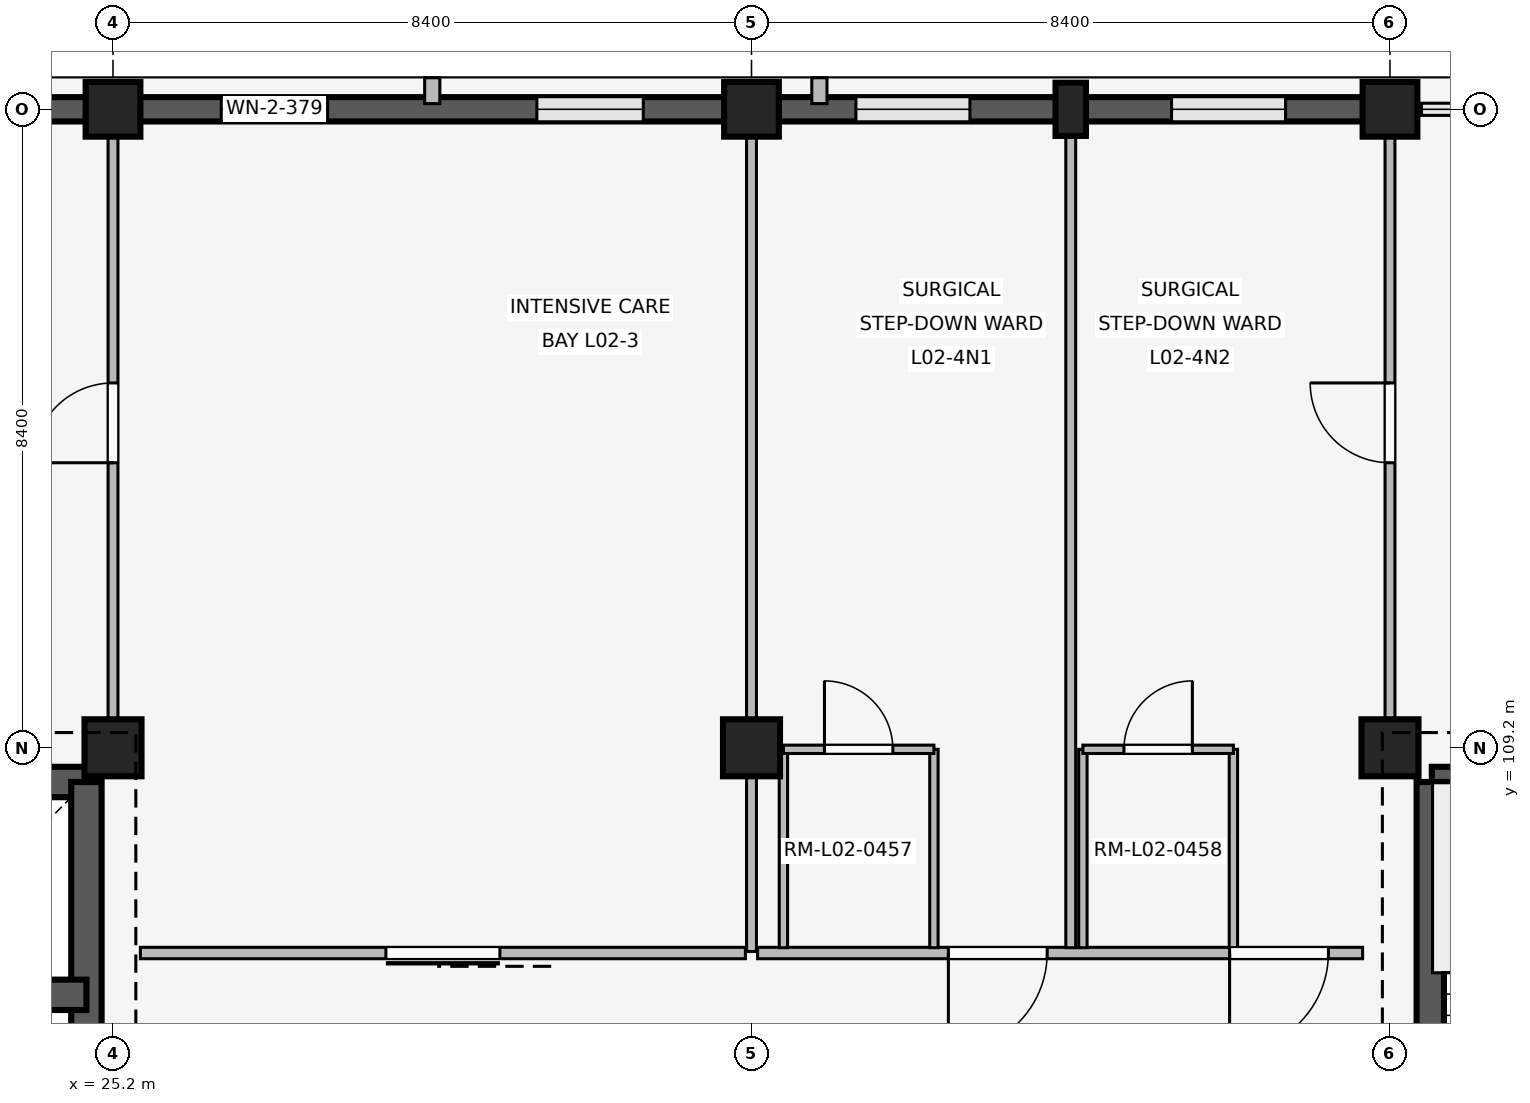
"""IFC4 building model, lengths in metres.
Left out: names, types, materials, properties, quantities, classifications, styles, units other than length and angle.
Written with IfcOpenShell. Run it as: python <this file> out.ifc"""

import sys

from ifc_helpers import new_model, si_unit, direction, frame, frame_2d, origin, origin_2d, place, context, subcontext, project, spatial, rectangle, extrude, element, fill, save


model = new_model("IFC4")
c1 = context("Model", 3, precision=1e-05, world=origin(), true_north=direction((0.0, 1.0)))
c2 = subcontext(c1, "Body", "Model", "MODEL_VIEW")
j1 = project(units=[si_unit("LENGTHUNIT", "METRE"), si_unit("PLANEANGLEUNIT", "RADIAN")], contexts=[c1])
p1 = place(None, origin())
s1 = spatial("IfcSite", under=j1, at=p1, CompositionType="ELEMENT")
p2 = place(p1, origin())
s2 = spatial("IfcBuilding", under=s1, at=p2, CompositionType="ELEMENT")
p3 = place(p2, frame((0.0, 0.0, 8.1)))
s3 = spatial("IfcBuildingStorey", under=s2, at=p3, CompositionType="ELEMENT", Elevation=8.1)
p4 = place(p3, frame((25.2, 109.2, 0.0), z_axis=(0.0, 0.0, 1.0), x_axis=(1.0, 0.0, 0.0)))
e1 = element("IfcColumn", 1, at=p4, inside=s3, PredefinedType="COLUMN", context=c2, shape_type="SweptSolid", body=[
    extrude(rectangle(XDim=0.75, YDim=0.75, at=origin_2d()), origin(), (0.0, 0.0, 1.0), 4.8),
])
p5 = place(p3, frame((25.2, 117.6, 0.0), z_axis=(0.0, 0.0, 1.0), x_axis=(1.0, 0.0, 0.0)))
e2 = element("IfcColumn", 2, at=p5, inside=s3, PredefinedType="COLUMN", context=c2, shape_type="SweptSolid", body=[
    extrude(rectangle(XDim=0.72, YDim=0.72, at=origin_2d()), origin(), (0.0, 0.0, 1.0), 4.8),
])
p6 = place(p3, frame((33.6, 109.2, 0.0), z_axis=(0.0, 0.0, 1.0), x_axis=(1.0, 0.0, 0.0)))
e3 = element("IfcColumn", 3, at=p6, inside=s3, PredefinedType="COLUMN", context=c2, shape_type="SweptSolid", body=[
    extrude(rectangle(XDim=0.75, YDim=0.75, at=origin_2d()), origin(), (0.0, 0.0, 1.0), 4.8),
])
p7 = place(p3, frame((33.6, 117.6, 0.0), z_axis=(0.0, 0.0, 1.0), x_axis=(1.0, 0.0, 0.0)))
e4 = element("IfcColumn", 4, at=p7, inside=s3, PredefinedType="COLUMN", context=c2, shape_type="SweptSolid", body=[
    extrude(rectangle(XDim=0.72, YDim=0.72, at=origin_2d()), origin(), (0.0, 0.0, 1.0), 4.8),
])
p8 = place(p3, frame((42.0, 109.2, 0.0), z_axis=(0.0, 0.0, 1.0), x_axis=(1.0, 0.0, 0.0)))
e5 = element("IfcColumn", 5, at=p8, inside=s3, PredefinedType="COLUMN", context=c2, shape_type="SweptSolid", body=[
    extrude(rectangle(XDim=0.75, YDim=0.75, at=origin_2d()), origin(), (0.0, 0.0, 1.0), 4.8),
])
p9 = place(p3, frame((42.0, 117.6, 0.0), z_axis=(0.0, 0.0, 1.0), x_axis=(1.0, 0.0, 0.0)))
e6 = element("IfcColumn", 6, at=p9, inside=s3, PredefinedType="COLUMN", context=c2, shape_type="SweptSolid", body=[
    extrude(rectangle(XDim=0.72, YDim=0.72, at=origin_2d()), origin(), (0.0, 0.0, 1.0), 4.8),
])
p10 = place(p3, frame((37.8, 117.6, 0.0), z_axis=(0.0, 0.0, 1.0), x_axis=(1.0, 0.0, 0.0)))
e7 = element("IfcColumn", 7, at=p10, inside=s3, PredefinedType="PILASTER", context=c2, shape_type="SweptSolid", body=[
    extrude(rectangle(XDim=0.4, YDim=0.7, at=origin_2d()), origin(), (0.0, 0.0, 1.0), 4.8),
])
p11 = place(p3, frame((17.155, 117.6, 0.0), z_axis=(0.0, 0.0, 1.0), x_axis=(1.0, 0.0, 0.0)))
e8 = element("IfcWall", 8, at=p11, inside=s3, PredefinedType="SOLIDWALL", context=c2, shape_type="SweptSolid", body=[
    extrude(rectangle(XDim=7.69, YDim=0.32, at=frame_2d((3.845, 0.0))), origin(), (0.0, 0.0, 1.0), 3.86),
])
p12 = place(p11, frame((1.189, 0.0, 0.85)))
e9 = element("IfcOpeningElement", 9, at=p12, cuts=e8, PredefinedType="OPENING", context=c2, shape_type="SweptSolid", body=[
    extrude(rectangle(XDim=1.16, YDim=1.48, at=frame_2d((0.58, 0.74))), frame((0.0, 0.17, 0.0), z_axis=(0.0, -1.0, 0.0), x_axis=(1.0, 0.0, 0.0)), (0.0, 0.0, 1.0), 0.34),
])
p13 = place(p11, frame((5.341, 0.0, 0.85)))
e10 = element("IfcOpeningElement", 10, at=p13, cuts=e8, PredefinedType="OPENING", context=c2, shape_type="SweptSolid", body=[
    extrude(rectangle(XDim=1.16, YDim=1.48, at=frame_2d((0.58, 0.74))), frame((0.0, 0.17, 0.0), z_axis=(0.0, -1.0, 0.0), x_axis=(1.0, 0.0, 0.0)), (0.0, 0.0, 1.0), 0.34),
])
p14 = place(p3, frame((25.555, 117.6, 0.0), z_axis=(0.0, 0.0, 1.0), x_axis=(1.0, 0.0, 0.0)))
e11 = element("IfcWall", 11, at=p14, inside=s3, PredefinedType="SOLIDWALL", context=c2, shape_type="SweptSolid", body=[
    extrude(rectangle(XDim=7.69, YDim=0.32, at=frame_2d((3.845, 0.0))), origin(), (0.0, 0.0, 1.0), 3.86),
])
p15 = place(p14, frame((1.069, 0.0, 0.85)))
e12 = element("IfcOpeningElement", 12, at=p15, cuts=e11, PredefinedType="OPENING", context=c2, shape_type="SweptSolid", body=[
    extrude(rectangle(XDim=1.4, YDim=1.4, at=frame_2d((0.7, 0.7))), frame((0.0, 0.17, 0.0), z_axis=(0.0, -1.0, 0.0), x_axis=(1.0, 0.0, 0.0)), (0.0, 0.0, 1.0), 0.34),
])
p16 = place(p14, frame((5.221, 0.0, 0.85)))
e13 = element("IfcOpeningElement", 13, at=p16, cuts=e11, PredefinedType="OPENING", context=c2, shape_type="SweptSolid", body=[
    extrude(rectangle(XDim=1.4, YDim=1.4, at=frame_2d((0.7, 0.7))), frame((0.0, 0.17, 0.0), z_axis=(0.0, -1.0, 0.0), x_axis=(1.0, 0.0, 0.0)), (0.0, 0.0, 1.0), 0.34),
])
p17 = place(p3, frame((29.4, 117.675, 0.0), z_axis=(0.0, 0.0, 1.0), x_axis=(0.0, 1.0, 0.0)))
e14 = element("IfcWall", 14, at=p17, inside=s3, PredefinedType="ELEMENTEDWALL", context=c2, shape_type="SweptSolid", body=[
    extrude(rectangle(XDim=0.34, YDim=0.2, at=frame_2d((0.17, 0.0))), origin(), (0.0, 0.0, 1.0), 3.84),
])
p18 = place(p3, frame((33.955, 117.6, 0.0), z_axis=(0.0, 0.0, 1.0), x_axis=(1.0, 0.0, 0.0)))
e15 = element("IfcWall", 15, at=p18, inside=s3, PredefinedType="SOLIDWALL", context=c2, shape_type="SweptSolid", body=[
    extrude(rectangle(XDim=7.69, YDim=0.32, at=frame_2d((3.845, 0.0))), origin(), (0.0, 0.0, 1.0), 3.86),
])
p19 = place(p18, frame((1.019, 0.0, 0.85)))
e16 = element("IfcOpeningElement", 16, at=p19, cuts=e15, PredefinedType="OPENING", context=c2, shape_type="SweptSolid", body=[
    extrude(rectangle(XDim=1.5, YDim=1.55, at=frame_2d((0.75, 0.775))), frame((0.0, 0.17, 0.0), z_axis=(0.0, -1.0, 0.0), x_axis=(1.0, 0.0, 0.0)), (0.0, 0.0, 1.0), 0.34),
])
p20 = place(p18, frame((5.171, 0.0, 0.85)))
e17 = element("IfcOpeningElement", 17, at=p20, cuts=e15, PredefinedType="OPENING", context=c2, shape_type="SweptSolid", body=[
    extrude(rectangle(XDim=1.5, YDim=1.55, at=frame_2d((0.75, 0.775))), frame((0.0, 0.17, 0.0), z_axis=(0.0, -1.0, 0.0), x_axis=(1.0, 0.0, 0.0)), (0.0, 0.0, 1.0), 0.34),
])
p21 = place(p3, frame((34.493, 117.675, 0.0), z_axis=(0.0, 0.0, 1.0), x_axis=(0.0, 1.0, 0.0)))
e18 = element("IfcWall", 18, at=p21, inside=s3, PredefinedType="ELEMENTEDWALL", context=c2, shape_type="SweptSolid", body=[
    extrude(rectangle(XDim=0.34, YDim=0.2, at=frame_2d((0.17, 0.0))), origin(), (0.0, 0.0, 1.0), 3.84),
])
p22 = place(p3, frame((42.55, 108.75, 0.0), z_axis=(0.0, 0.0, 1.0), x_axis=(1.0, 0.0, 0.0)))
e19 = element("IfcWall", 19, at=p22, inside=s3, PredefinedType="SHEAR", context=c2, shape_type="SweptSolid", body=[
    extrude(rectangle(XDim=7.5, YDim=0.4, at=frame_2d((3.75, 0.0))), origin(), (0.0, 0.0, 1.0), 4.52),
])
p23 = place(p3, frame((42.55, 101.2, 0.0), z_axis=(0.0, 0.0, 1.0), x_axis=(0.0, 1.0, 0.0)))
e20 = element("IfcWall", 20, at=p23, inside=s3, PredefinedType="SHEAR", context=c2, shape_type="SweptSolid", body=[
    extrude(rectangle(XDim=7.55, YDim=0.4, at=frame_2d((3.775, 0.0))), origin(), (0.0, 0.0, 1.0), 4.52),
])
p24 = place(p23, frame((0.28, 0.0, 0.0)))
e21 = element("IfcOpeningElement", 21, at=p24, cuts=e20, PredefinedType="OPENING", context=c2, shape_type="SweptSolid", body=[
    extrude(rectangle(XDim=1.0, YDim=2.15, at=frame_2d((0.5, 1.075))), frame((0.0, 0.21, 0.0), z_axis=(0.0, -1.0, 0.0), x_axis=(1.0, 0.0, 0.0)), (0.0, 0.0, 1.0), 0.42),
])
p25 = place(p3, frame((17.35, 108.75, 0.0), z_axis=(0.0, 0.0, 1.0), x_axis=(1.0, 0.0, 0.0)))
e22 = element("IfcWall", 22, at=p25, inside=s3, PredefinedType="SHEAR", context=c2, shape_type="SweptSolid", body=[
    extrude(rectangle(XDim=7.5, YDim=0.4, at=frame_2d((3.75, 0.0))), origin(), (0.0, 0.0, 1.0), 4.52),
])
p26 = place(p3, frame((24.85, 101.2, 0.0), z_axis=(0.0, 0.0, 1.0), x_axis=(0.0, 1.0, 0.0)))
e23 = element("IfcWall", 23, at=p26, inside=s3, PredefinedType="SHEAR", context=c2, shape_type="SweptSolid", body=[
    extrude(rectangle(XDim=7.55, YDim=0.4, at=frame_2d((3.775, 0.0))), origin(), (0.0, 0.0, 1.0), 4.52),
])
p27 = place(p26, frame((2.4, 0.0, 0.0)))
e24 = element("IfcOpeningElement", 24, at=p27, cuts=e23, PredefinedType="OPENING", context=c2, shape_type="SweptSolid", body=[
    extrude(rectangle(XDim=1.2, YDim=2.2, at=frame_2d((0.6, 1.1))), frame((0.0, 0.21, 0.0), z_axis=(0.0, -1.0, 0.0), x_axis=(1.0, 0.0, 0.0)), (0.0, 0.0, 1.0), 0.42),
])
p28 = place(p3, frame((21.05, 105.95, 0.0), z_axis=(0.0, 0.0, 1.0), x_axis=(1.0, 0.0, 0.0)))
e25 = element("IfcWall", 25, at=p28, inside=s3, PredefinedType="SHEAR", context=c2, shape_type="SweptSolid", body=[
    extrude(rectangle(XDim=3.8, YDim=0.4, at=frame_2d((1.9, 0.0))), origin(), (0.0, 0.0, 1.0), 4.52),
])
p29 = place(p28, frame((0.32, 0.0, 0.0)))
e26 = element("IfcOpeningElement", 26, at=p29, cuts=e25, PredefinedType="OPENING", context=c2, shape_type="SweptSolid", body=[
    extrude(rectangle(XDim=1.1, YDim=2.15, at=frame_2d((0.55, 1.075))), frame((0.0, 0.21, 0.0), z_axis=(0.0, -1.0, 0.0), x_axis=(1.0, 0.0, 0.0)), (0.0, 0.0, 1.0), 0.42),
])
p30 = place(p3, frame((25.2, 109.55, 0.0), z_axis=(0.0, 0.0, 1.0), x_axis=(0.0, 1.0, 0.0)))
e27 = element("IfcWall", 27, at=p30, inside=s3, PredefinedType="PARTITIONING", context=c2, shape_type="SweptSolid", body=[
    extrude(rectangle(XDim=7.91, YDim=0.13, at=frame_2d((3.955, 0.0))), origin(), (0.0, 0.0, 1.0), 3.84),
])
p31 = place(p30, frame((3.4, 0.0, 0.0)))
e28 = element("IfcOpeningElement", 28, at=p31, cuts=e27, PredefinedType="OPENING", context=c2, shape_type="SweptSolid", body=[
    extrude(rectangle(XDim=1.05, YDim=2.2, at=frame_2d((0.525, 1.1))), frame((0.0, 0.075, 0.0), z_axis=(0.0, -1.0, 0.0), x_axis=(1.0, 0.0, 0.0)), (0.0, 0.0, 1.0), 0.15),
])
p32 = place(p3, frame((33.52, 106.5, 0.0), z_axis=(0.0, 0.0, 1.0), x_axis=(-1.0, 0.0, 0.0)))
e29 = element("IfcWall", 29, at=p32, inside=s3, PredefinedType="PARTITIONING", context=c2, shape_type="SweptSolid", body=[
    extrude(rectangle(XDim=7.96, YDim=0.15, at=frame_2d((3.98, 0.0))), origin(), (0.0, 0.0, 1.0), 3.84),
])
p33 = place(p32, frame((3.23, 0.0, 0.0)))
e30 = element("IfcOpeningElement", 30, at=p33, cuts=e29, PredefinedType="OPENING", context=c2, shape_type="SweptSolid", body=[
    extrude(rectangle(XDim=1.5, YDim=2.3, at=frame_2d((0.75, 1.15))), frame((0.0, 0.085, 0.0), z_axis=(0.0, -1.0, 0.0), x_axis=(1.0, 0.0, 0.0)), (0.0, 0.0, 1.0), 0.17),
])
p34 = place(p3, frame((33.6, 106.52, 0.0), z_axis=(0.0, 0.0, 1.0), x_axis=(0.0, 1.0, 0.0)))
e31 = element("IfcWall", 31, at=p34, inside=s3, PredefinedType="PARTITIONING", context=c2, shape_type="SweptSolid", body=[
    extrude(rectangle(XDim=10.94, YDim=0.13, at=frame_2d((5.47, 0.0))), origin(), (0.0, 0.0, 1.0), 3.84),
])
p35 = place(p3, frame((41.64, 106.5, 0.0), z_axis=(0.0, 0.0, 1.0), x_axis=(-1.0, 0.0, 0.0)))
e32 = element("IfcWall", 32, at=p35, inside=s3, PredefinedType="PARTITIONING", context=c2, shape_type="SweptSolid", body=[
    extrude(rectangle(XDim=7.96, YDim=0.15, at=frame_2d((3.98, 0.0))), origin(), (0.0, 0.0, 1.0), 3.84),
])
p36 = place(p35, frame((0.45, 0.0, 0.0)))
e33 = element("IfcOpeningElement", 33, at=p36, cuts=e32, PredefinedType="OPENING", context=c2, shape_type="SweptSolid", body=[
    extrude(rectangle(XDim=1.3, YDim=2.25, at=frame_2d((0.65, 1.125))), frame((0.0, 0.085, 0.0), z_axis=(0.0, -1.0, 0.0), x_axis=(1.0, 0.0, 0.0)), (0.0, 0.0, 1.0), 0.17),
])
p37 = place(p35, frame((4.15, 0.0, 0.0)))
e34 = element("IfcOpeningElement", 34, at=p37, cuts=e32, PredefinedType="OPENING", context=c2, shape_type="SweptSolid", body=[
    extrude(rectangle(XDim=1.3, YDim=2.25, at=frame_2d((0.65, 1.125))), frame((0.0, 0.085, 0.0), z_axis=(0.0, -1.0, 0.0), x_axis=(1.0, 0.0, 0.0)), (0.0, 0.0, 1.0), 0.17),
])
p38 = place(p3, frame((37.8, 106.57, 0.0), z_axis=(0.0, 0.0, 1.0), x_axis=(0.0, 1.0, 0.0)))
e35 = element("IfcWall", 35, at=p38, inside=s3, PredefinedType="PARTITIONING", context=c2, shape_type="SweptSolid", body=[
    extrude(rectangle(XDim=10.93, YDim=0.13, at=frame_2d((5.465, 0.0))), origin(), (0.0, 0.0, 1.0), 3.84),
])
for number, where, z_axis, x_axis in (
    (36, (34.02, 106.57, 0.0), (0.0, 0.0, 1.0), (0.0, 1.0, 0.0)),
    (37, (36.0, 106.57, 0.0), (0.0, 0.0, 1.0), (0.0, 1.0, 0.0)),
):
    element("IfcWall", number, at=place(p3, frame(where, z_axis=z_axis, x_axis=x_axis)), inside=s3, PredefinedType="PARTITIONING", context=c2, shape_type="SweptSolid", body=[
        extrude(rectangle(XDim=2.61, YDim=0.11, at=frame_2d((1.305, 0.0))), origin(), (0.0, 0.0, 1.0), 3.84),
    ])
p39 = place(p3, frame((34.02, 109.18, 0.0), z_axis=(0.0, 0.0, 1.0), x_axis=(1.0, 0.0, 0.0)))
e38 = element("IfcWall", 38, at=p39, inside=s3, PredefinedType="PARTITIONING", context=c2, shape_type="SweptSolid", body=[
    extrude(rectangle(XDim=1.98, YDim=0.11, at=frame_2d((0.99, 0.0))), origin(), (0.0, 0.0, 1.0), 3.84),
])
p40 = place(p39, frame((0.54, 0.0, 0.0)))
e39 = element("IfcOpeningElement", 39, at=p40, cuts=e38, PredefinedType="OPENING", context=c2, shape_type="SweptSolid", body=[
    extrude(rectangle(XDim=0.9, YDim=2.1, at=frame_2d((0.45, 1.05))), frame((0.0, 0.065, 0.0), z_axis=(0.0, -1.0, 0.0), x_axis=(1.0, 0.0, 0.0)), (0.0, 0.0, 1.0), 0.13),
])
for number, where, z_axis, x_axis in (
    (40, (37.96, 106.57, 0.0), (0.0, 0.0, 1.0), (0.0, 1.0, 0.0)),
    (41, (39.94, 106.57, 0.0), (0.0, 0.0, 1.0), (0.0, 1.0, 0.0)),
):
    element("IfcWall", number, at=place(p3, frame(where, z_axis=z_axis, x_axis=x_axis)), inside=s3, PredefinedType="PARTITIONING", context=c2, shape_type="SweptSolid", body=[
        extrude(rectangle(XDim=2.61, YDim=0.11, at=frame_2d((1.305, 0.0))), origin(), (0.0, 0.0, 1.0), 3.84),
    ])
p41 = place(p3, frame((37.96, 109.18, 0.0), z_axis=(0.0, 0.0, 1.0), x_axis=(1.0, 0.0, 0.0)))
e42 = element("IfcWall", 42, at=p41, inside=s3, PredefinedType="PARTITIONING", context=c2, shape_type="SweptSolid", body=[
    extrude(rectangle(XDim=1.98, YDim=0.11, at=frame_2d((0.99, 0.0))), origin(), (0.0, 0.0, 1.0), 3.84),
])
p42 = place(p41, frame((0.54, 0.0, 0.0)))
e43 = element("IfcOpeningElement", 43, at=p42, cuts=e42, PredefinedType="OPENING", context=c2, shape_type="SweptSolid", body=[
    extrude(rectangle(XDim=0.9, YDim=2.1, at=frame_2d((0.45, 1.05))), frame((0.0, 0.065, 0.0), z_axis=(0.0, -1.0, 0.0), x_axis=(1.0, 0.0, 0.0)), (0.0, 0.0, 1.0), 0.13),
])
p43 = place(p3, frame((42.0, 109.55, 0.0), z_axis=(0.0, 0.0, 1.0), x_axis=(0.0, 1.0, 0.0)))
e44 = element("IfcWall", 44, at=p43, inside=s3, PredefinedType="PARTITIONING", context=c2, shape_type="SweptSolid", body=[
    extrude(rectangle(XDim=7.91, YDim=0.13, at=frame_2d((3.955, 0.0))), origin(), (0.0, 0.0, 1.0), 3.84),
])
p44 = place(p43, frame((3.4, 0.0, 0.0)))
e45 = element("IfcOpeningElement", 45, at=p44, cuts=e44, PredefinedType="OPENING", context=c2, shape_type="SweptSolid", body=[
    extrude(rectangle(XDim=1.05, YDim=2.2, at=frame_2d((0.525, 1.1))), frame((0.0, 0.075, 0.0), z_axis=(0.0, -1.0, 0.0), x_axis=(1.0, 0.0, 0.0)), (0.0, 0.0, 1.0), 0.15),
])
p45 = place(p15, origin())
e46 = element("IfcWindow", 46, at=p45, inside=s3, PartitioningType="SINGLE_PANEL", PredefinedType="WINDOW", context=c2, shape_type="SweptSolid", body=[
    extrude(rectangle(XDim=1.4, YDim=1.4, at=frame_2d((0.7, 0.7))), frame((0.0, 0.03, 0.0), z_axis=(0.0, -1.0, 0.0), x_axis=(1.0, 0.0, 0.0)), (0.0, 0.0, 1.0), 0.06),
])
fill(e12, e46)
p46 = place(p16, origin())
e47 = element("IfcWindow", 47, at=p46, inside=s3, PartitioningType="SINGLE_PANEL", PredefinedType="WINDOW", context=c2, shape_type="SweptSolid", body=[
    extrude(rectangle(XDim=1.4, YDim=1.4, at=frame_2d((0.7, 0.7))), frame((0.0, 0.03, 0.0), z_axis=(0.0, -1.0, 0.0), x_axis=(1.0, 0.0, 0.0)), (0.0, 0.0, 1.0), 0.06),
])
fill(e13, e47)
p47 = place(p19, origin())
e48 = element("IfcWindow", 48, at=p47, inside=s3, PartitioningType="SINGLE_PANEL", PredefinedType="WINDOW", context=c2, shape_type="SweptSolid", body=[
    extrude(rectangle(XDim=1.5, YDim=1.55, at=frame_2d((0.75, 0.775))), frame((0.0, 0.03, 0.0), z_axis=(0.0, -1.0, 0.0), x_axis=(1.0, 0.0, 0.0)), (0.0, 0.0, 1.0), 0.06),
])
fill(e16, e48)
p48 = place(p20, origin())
e49 = element("IfcWindow", 49, at=p48, inside=s3, PartitioningType="SINGLE_PANEL", PredefinedType="WINDOW", context=c2, shape_type="SweptSolid", body=[
    extrude(rectangle(XDim=1.5, YDim=1.55, at=frame_2d((0.75, 0.775))), frame((0.0, 0.03, 0.0), z_axis=(0.0, -1.0, 0.0), x_axis=(1.0, 0.0, 0.0)), (0.0, 0.0, 1.0), 0.06),
])
fill(e17, e49)
p49 = place(p31, origin())
e50 = element("IfcDoor", 50, at=p49, inside=s3, OperationType="SINGLE_SWING_LEFT", PredefinedType="DOOR", context=c2, shape_type="SweptSolid", body=[
    extrude(rectangle(XDim=1.05, YDim=2.2, at=frame_2d((0.525, 1.1))), frame((0.0, 0.025, 0.0), z_axis=(0.0, -1.0, 0.0), x_axis=(1.0, 0.0, 0.0)), (0.0, 0.0, 1.0), 0.05),
])
fill(e28, e50)
p50 = place(p33, origin())
e51 = element("IfcDoor", 51, at=p50, inside=s3, OperationType="SLIDING_TO_LEFT", PredefinedType="DOOR", context=c2, shape_type="SweptSolid", body=[
    extrude(rectangle(XDim=1.5, YDim=2.3, at=frame_2d((0.75, 1.15))), frame((0.0, 0.025, 0.0), z_axis=(0.0, -1.0, 0.0), x_axis=(1.0, 0.0, 0.0)), (0.0, 0.0, 1.0), 0.05),
])
fill(e30, e51)
p51 = place(p36, origin())
e52 = element("IfcDoor", 52, at=p51, inside=s3, OperationType="SINGLE_SWING_RIGHT", PredefinedType="DOOR", context=c2, shape_type="SweptSolid", body=[
    extrude(rectangle(XDim=1.3, YDim=2.25, at=frame_2d((0.65, 1.125))), frame((0.0, 0.025, 0.0), z_axis=(0.0, -1.0, 0.0), x_axis=(1.0, 0.0, 0.0)), (0.0, 0.0, 1.0), 0.05),
])
fill(e33, e52)
p52 = place(p37, origin())
e53 = element("IfcDoor", 53, at=p52, inside=s3, OperationType="SINGLE_SWING_RIGHT", PredefinedType="DOOR", context=c2, shape_type="SweptSolid", body=[
    extrude(rectangle(XDim=1.3, YDim=2.25, at=frame_2d((0.65, 1.125))), frame((0.0, 0.025, 0.0), z_axis=(0.0, -1.0, 0.0), x_axis=(1.0, 0.0, 0.0)), (0.0, 0.0, 1.0), 0.05),
])
fill(e34, e53)
p53 = place(p40, origin())
e54 = element("IfcDoor", 54, at=p53, inside=s3, OperationType="SINGLE_SWING_LEFT", PredefinedType="DOOR", context=c2, shape_type="SweptSolid", body=[
    extrude(rectangle(XDim=0.9, YDim=2.1, at=frame_2d((0.45, 1.05))), frame((0.0, 0.025, 0.0), z_axis=(0.0, -1.0, 0.0), x_axis=(1.0, 0.0, 0.0)), (0.0, 0.0, 1.0), 0.05),
])
fill(e39, e54)
p54 = place(p42, origin())
e55 = element("IfcDoor", 55, at=p54, inside=s3, OperationType="SINGLE_SWING_RIGHT", PredefinedType="DOOR", context=c2, shape_type="SweptSolid", body=[
    extrude(rectangle(XDim=0.9, YDim=2.1, at=frame_2d((0.45, 1.05))), frame((0.0, 0.025, 0.0), z_axis=(0.0, -1.0, 0.0), x_axis=(1.0, 0.0, 0.0)), (0.0, 0.0, 1.0), 0.05),
])
fill(e43, e55)
p55 = place(p44, origin())
e56 = element("IfcDoor", 56, at=p55, inside=s3, OperationType="SINGLE_SWING_RIGHT", PredefinedType="DOOR", context=c2, shape_type="SweptSolid", body=[
    extrude(rectangle(XDim=1.05, YDim=2.2, at=frame_2d((0.525, 1.1))), frame((0.0, 0.025, 0.0), z_axis=(0.0, -1.0, 0.0), x_axis=(1.0, 0.0, 0.0)), (0.0, 0.0, 1.0), 0.05),
])
fill(e45, e56)
save(model, sys.argv[1])
